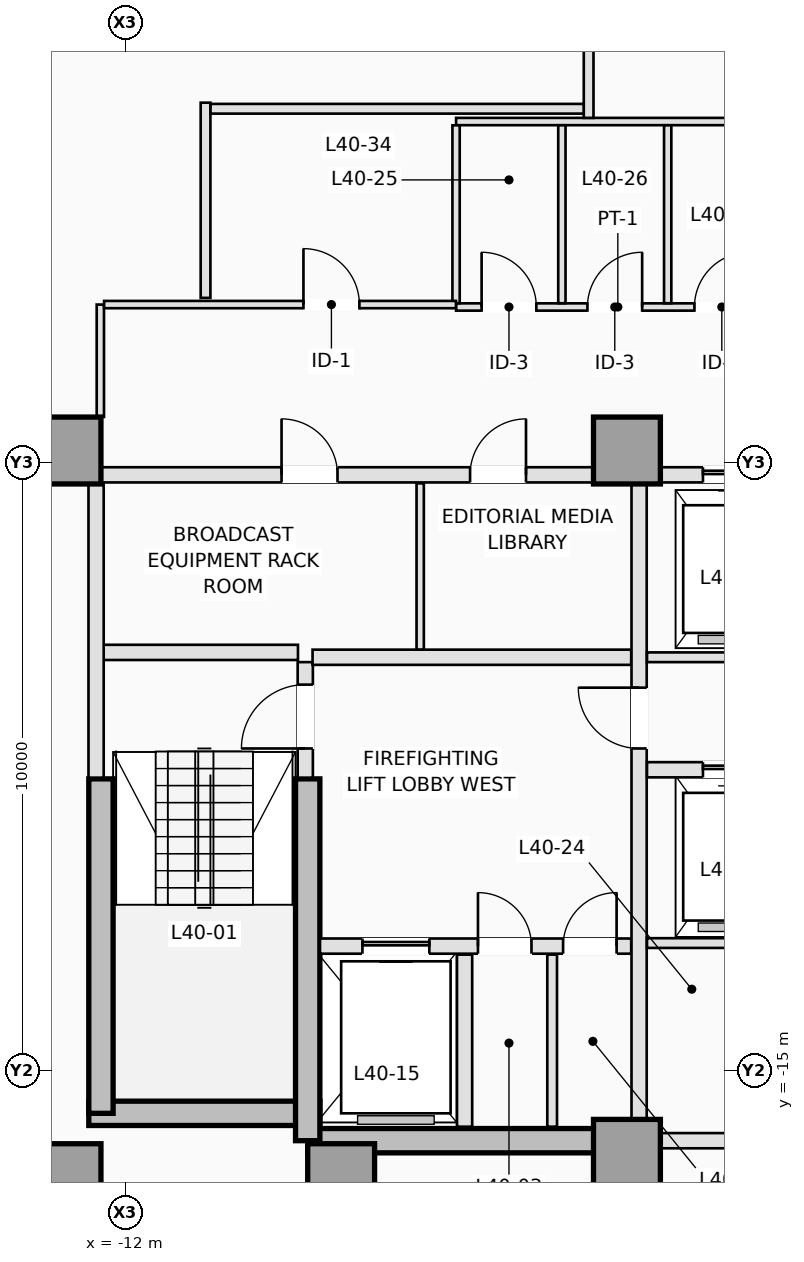
"""IFC4 building model, lengths in metres.
Left out: names, types, materials, properties, quantities, classifications, styles, units other than length and angle.
Written with IfcOpenShell. Run it as: python <this file> out.ifc"""

import sys

from ifc_helpers import new_model, si_unit, direction, frame, frame_2d, origin, origin_2d, place, context, subcontext, project, spatial, rectangle, extrude, element, fill, save


model = new_model("IFC4")
c1 = context("Model", 3, precision=1e-05, world=origin(), true_north=direction((0.0, 1.0)))
c2 = subcontext(c1, "Body", "Model", "MODEL_VIEW")
j1 = project(units=[si_unit("LENGTHUNIT", "METRE"), si_unit("PLANEANGLEUNIT", "RADIAN")], contexts=[c1])
p1 = place(None, origin())
s1 = spatial("IfcSite", under=j1, at=p1, CompositionType="ELEMENT")
p2 = place(p1, origin())
s2 = spatial("IfcBuilding", under=s1, at=p2, CompositionType="ELEMENT")
p3 = place(p2, frame((0.0, 0.0, 147.5)))
s3 = spatial("IfcBuildingStorey", under=s2, at=p3, CompositionType="ELEMENT", Elevation=147.5)
p4 = place(p3, frame((-12.6, -15.7, 0.0), z_axis=(0.0, 0.0, 1.0), x_axis=(1.0, 0.0, 0.0)))
e1 = element("IfcWall", 1, at=p4, inside=s3, PredefinedType="SHEAR", context=c2, shape_type="SweptSolid", body=[
    extrude(rectangle(XDim=3.8, YDim=0.4, at=frame_2d((1.9, 0.0))), origin(), (0.0, 0.0, 1.0), 3.5),
])
p5 = place(p3, frame((-9.0, -16.15, 0.0), z_axis=(0.0, 0.0, 1.0), x_axis=(1.0, 0.0, 0.0)))
e2 = element("IfcWall", 2, at=p5, inside=s3, PredefinedType="SHEAR", context=c2, shape_type="SweptSolid", body=[
    extrude(rectangle(XDim=5.25, YDim=0.4, at=frame_2d((2.625, 0.0))), origin(), (0.0, 0.0, 1.0), 3.5),
])
p6 = place(p3, frame((-12.4, -15.7, 0.0), z_axis=(0.0, 0.0, 1.0), x_axis=(0.0, 1.0, 0.0)))
e3 = element("IfcWall", 3, at=p6, inside=s3, PredefinedType="SHEAR", context=c2, shape_type="SweptSolid", body=[
    extrude(rectangle(XDim=5.5, YDim=0.4, at=frame_2d((2.75, 0.0))), origin(), (0.0, 0.0, 1.0), 3.5),
])
p7 = place(p3, frame((-9.0, -16.15, 0.0), z_axis=(0.0, 0.0, 1.0), x_axis=(0.0, 1.0, 0.0)))
e4 = element("IfcWall", 4, at=p7, inside=s3, PredefinedType="SHEAR", context=c2, shape_type="SweptSolid", body=[
    extrude(rectangle(XDim=5.95, YDim=0.4, at=frame_2d((2.975, 0.0))), origin(), (0.0, 0.0, 1.0), 3.5),
])
for number, where, z_axis, x_axis in (
    (5, (-12.95, -16.75, 0.0), (0.0, 0.0, 1.0), (1.0, 0.0, 0.0)),
    (6, (-8.45, -16.75, 0.0), (0.0, 0.0, 1.0), (1.0, 0.0, 0.0)),
    (7, (-3.75, -16.35, 0.0), (0.0, 0.0, 1.0), (1.0, 0.0, 0.0)),
    (8, (-12.95, -4.8, 0.0), (0.0, 0.0, 1.0), (1.0, 0.0, 0.0)),
    (9, (-3.75, -4.8, 0.0), (0.0, 0.0, 1.0), (1.0, 0.0, 0.0)),
):
    element("IfcColumn", number, at=place(p3, frame(where, z_axis=z_axis, x_axis=x_axis)), inside=s3, PredefinedType="COLUMN", context=c2, shape_type="SweptSolid", body=[
        extrude(rectangle(XDim=1.1, YDim=1.1, at=origin_2d()), origin(), (0.0, 0.0, 1.0), 3.5),
    ])
p8 = place(p3, frame((-15.383, -0.305, 0.0), z_axis=(0.0, 0.0, 1.0), x_axis=(0.490232095789, 0.871591929895, 0.0)))
e10 = element("IfcWall", 10, at=p8, inside=s3, PredefinedType="STANDARD", context=c2, shape_type="SweptSolid", body=[
    extrude(rectangle(XDim=4.375, YDim=0.28, at=frame_2d((2.188, 0.0))), origin(), (0.0, 0.0, 1.0), 3.25),
])
p9 = place(p3, frame((-9.04, -10.18, 0.0), z_axis=(0.0, 0.0, 1.0), x_axis=(0.0, 1.0, 0.0)))
e11 = element("IfcWall", 11, at=p9, inside=s3, PredefinedType="PARTITIONING", context=c2, shape_type="SweptSolid", body=[
    extrude(rectangle(XDim=1.9, YDim=0.25, at=frame_2d((0.95, 0.0))), origin(), (0.0, 0.0, 1.0), 3.25),
])
p10 = place(p9, frame((0.48, 0.0, 0.0)))
e12 = element("IfcOpeningElement", 12, at=p10, cuts=e11, PredefinedType="OPENING", context=c2, shape_type="SweptSolid", body=[
    extrude(rectangle(XDim=1.05, YDim=2.15, at=frame_2d((0.525, 1.075))), frame((0.0, 0.135, 0.0), z_axis=(0.0, -1.0, 0.0), x_axis=(1.0, 0.0, 0.0)), (0.0, 0.0, 1.0), 0.27),
])
p11 = place(p3, frame((-12.38, -8.12, 0.0), z_axis=(0.0, 0.0, 1.0), x_axis=(1.0, 0.0, 0.0)))
e13 = element("IfcWall", 13, at=p11, inside=s3, PredefinedType="PARTITIONING", context=c2, shape_type="SweptSolid", body=[
    extrude(rectangle(XDim=3.22, YDim=0.25, at=frame_2d((1.61, 0.0))), origin(), (0.0, 0.0, 1.0), 3.25),
])
p12 = place(p3, frame((-12.48, -10.18, 0.0), z_axis=(0.0, 0.0, 1.0), x_axis=(0.0, 1.0, 0.0)))
e14 = element("IfcWall", 14, at=p12, inside=s3, PredefinedType="PARTITIONING", context=c2, shape_type="SweptSolid", body=[
    extrude(rectangle(XDim=4.828, YDim=0.25, at=frame_2d((2.414, 0.0))), origin(), (0.0, 0.0, 1.0), 3.25),
])
p13 = place(p3, frame((-8.798, -12.95, 0.0), z_axis=(0.0, 0.0, 1.0), x_axis=(1.0, 0.0, 0.0)))
e15 = element("IfcWall", 15, at=p13, inside=s3, PredefinedType="PARTITIONING", context=c2, shape_type="SweptSolid", body=[
    extrude(rectangle(XDim=5.118, YDim=0.25, at=frame_2d((2.559, 0.0))), origin(), (0.0, 0.0, 1.0), 3.25),
])
p14 = place(p13, frame((0.698, 0.0, 0.0)))
e16 = element("IfcOpeningElement", 16, at=p14, cuts=e15, PredefinedType="OPENING", context=c2, shape_type="SweptSolid", body=[
    extrude(rectangle(XDim=1.1, YDim=2.15, at=frame_2d((0.55, 1.075))), frame((0.0, 0.135, 0.0), z_axis=(0.0, -1.0, 0.0), x_axis=(1.0, 0.0, 0.0)), (0.0, 0.0, 1.0), 0.27),
])
p15 = place(p13, frame((2.598, 0.0, 0.0)))
e17 = element("IfcOpeningElement", 17, at=p15, cuts=e15, PredefinedType="OPENING", context=c2, shape_type="SweptSolid", body=[
    extrude(rectangle(XDim=0.88, YDim=2.1, at=frame_2d((0.44, 1.05))), frame((0.0, 0.135, 0.0), z_axis=(0.0, -1.0, 0.0), x_axis=(1.0, 0.0, 0.0)), (0.0, 0.0, 1.0), 0.27),
])
p16 = place(p13, frame((3.998, 0.0, 0.0)))
e18 = element("IfcOpeningElement", 18, at=p16, cuts=e15, PredefinedType="OPENING", context=c2, shape_type="SweptSolid", body=[
    extrude(rectangle(XDim=0.88, YDim=2.1, at=frame_2d((0.44, 1.05))), frame((0.0, 0.135, 0.0), z_axis=(0.0, -1.0, 0.0), x_axis=(1.0, 0.0, 0.0)), (0.0, 0.0, 1.0), 0.27),
])
p17 = place(p3, frame((-6.42, -15.92, 0.0), z_axis=(0.0, 0.0, 1.0), x_axis=(0.0, 1.0, 0.0)))
e19 = element("IfcWall", 19, at=p17, inside=s3, PredefinedType="PARTITIONING", context=c2, shape_type="SweptSolid", body=[
    extrude(rectangle(XDim=2.83, YDim=0.25, at=frame_2d((1.415, 0.0))), origin(), (0.0, 0.0, 1.0), 3.25),
])
p18 = place(p3, frame((-4.98, -15.92, 0.0), z_axis=(0.0, 0.0, 1.0), x_axis=(0.0, 1.0, 0.0)))
e20 = element("IfcWall", 20, at=p18, inside=s3, PredefinedType="PARTITIONING", context=c2, shape_type="SweptSolid", body=[
    extrude(rectangle(XDim=2.83, YDim=0.16, at=frame_2d((1.415, 0.0))), origin(), (0.0, 0.0, 1.0), 3.25),
])
p19 = place(p3, frame((-8.92, -8.2, 0.0), z_axis=(0.0, 0.0, 1.0), x_axis=(1.0, 0.0, 0.0)))
e21 = element("IfcWall", 21, at=p19, inside=s3, PredefinedType="PARTITIONING", context=c2, shape_type="SweptSolid", body=[
    extrude(rectangle(XDim=5.24, YDim=0.25, at=frame_2d((2.62, 0.0))), origin(), (0.0, 0.0, 1.0), 3.25),
])
p20 = place(p3, frame((-3.55, -15.798, 0.0), z_axis=(0.0, 0.0, 1.0), x_axis=(0.0, 1.0, 0.0)))
e22 = element("IfcWall", 22, at=p20, inside=s3, PredefinedType="PARTITIONING", context=c2, shape_type="SweptSolid", body=[
    extrude(rectangle(XDim=10.446, YDim=0.25, at=frame_2d((5.223, 0.0))), origin(), (0.0, 0.0, 1.0), 3.25),
])
p21 = place(p20, frame((6.098, 0.0, 0.0)))
e23 = element("IfcOpeningElement", 23, at=p21, cuts=e22, PredefinedType="OPENING", context=c2, shape_type="SweptSolid", body=[
    extrude(rectangle(XDim=1.0, YDim=2.15, at=frame_2d((0.5, 1.075))), frame((0.0, 0.135, 0.0), z_axis=(0.0, -1.0, 0.0), x_axis=(1.0, 0.0, 0.0)), (0.0, 0.0, 1.0), 0.27),
])
p22 = place(p3, frame((-12.398, -5.2, 0.0), z_axis=(0.0, 0.0, 1.0), x_axis=(1.0, 0.0, 0.0)))
e24 = element("IfcWall", 24, at=p22, inside=s3, PredefinedType="PARTITIONING", context=c2, shape_type="SweptSolid", body=[
    extrude(rectangle(XDim=8.096, YDim=0.25, at=frame_2d((4.048, 0.0))), origin(), (0.0, 0.0, 1.0), 3.25),
])
p23 = place(p22, frame((2.968, 0.0, 0.0)))
e25 = element("IfcOpeningElement", 25, at=p23, cuts=e24, PredefinedType="OPENING", context=c2, shape_type="SweptSolid", body=[
    extrude(rectangle(XDim=0.92, YDim=2.12, at=frame_2d((0.46, 1.06))), frame((0.0, 0.135, 0.0), z_axis=(0.0, -1.0, 0.0), x_axis=(1.0, 0.0, 0.0)), (0.0, 0.0, 1.0), 0.27),
])
p24 = place(p22, frame((6.068, 0.0, 0.0)))
e26 = element("IfcOpeningElement", 26, at=p24, cuts=e24, PredefinedType="OPENING", context=c2, shape_type="SweptSolid", body=[
    extrude(rectangle(XDim=0.92, YDim=2.12, at=frame_2d((0.46, 1.06))), frame((0.0, 0.135, 0.0), z_axis=(0.0, -1.0, 0.0), x_axis=(1.0, 0.0, 0.0)), (0.0, 0.0, 1.0), 0.27),
])
p25 = place(p3, frame((-3.198, -5.2, 0.0), z_axis=(0.0, 0.0, 1.0), x_axis=(1.0, 0.0, 0.0)))
e27 = element("IfcWall", 27, at=p25, inside=s3, PredefinedType="PARTITIONING", context=c2, shape_type="SweptSolid", body=[
    extrude(rectangle(XDim=2.248, YDim=0.25, at=frame_2d((1.124, 0.0))), origin(), (0.0, 0.0, 1.0), 3.25),
])
p26 = place(p25, frame((0.698, 0.0, 0.0)))
e28 = element("IfcOpeningElement", 28, at=p26, cuts=e27, PredefinedType="OPENING", context=c2, shape_type="SweptSolid", body=[
    extrude(rectangle(XDim=1.0, YDim=2.15, at=frame_2d((0.5, 1.075))), frame((0.0, 0.135, 0.0), z_axis=(0.0, -1.0, 0.0), x_axis=(1.0, 0.0, 0.0)), (0.0, 0.0, 1.0), 0.27),
])
p27 = place(p3, frame((-7.15, -8.073, 0.0), z_axis=(0.0, 0.0, 1.0), x_axis=(0.0, 1.0, 0.0)))
e29 = element("IfcWall", 29, at=p27, inside=s3, PredefinedType="PARTITIONING", context=c2, shape_type="SweptSolid", body=[
    extrude(rectangle(XDim=2.733, YDim=0.12, at=frame_2d((1.366, 0.0))), origin(), (0.0, 0.0, 1.0), 3.25),
])
p28 = place(p3, frame((-3.198, -16.15, 0.0), z_axis=(0.0, 0.0, 1.0), x_axis=(1.0, 0.0, 0.0)))
e30 = element("IfcWall", 30, at=p28, inside=s3, PredefinedType="PARTITIONING", context=c2, shape_type="SweptSolid", body=[
    extrude(rectangle(XDim=6.396, YDim=0.25, at=frame_2d((3.198, 0.0))), origin(), (0.0, 0.0, 1.0), 2.45),
])
p29 = place(p3, frame((-3.42, -8.2, 0.0), z_axis=(0.0, 0.0, 1.0), x_axis=(1.0, 0.0, 0.0)))
e31 = element("IfcWall", 31, at=p29, inside=s3, PredefinedType="PARTITIONING", context=c2, shape_type="SweptSolid", body=[
    extrude(rectangle(XDim=2.47, YDim=0.16, at=frame_2d((1.235, 0.0))), origin(), (0.0, 0.0, 1.0), 3.25),
])
p30 = place(p3, frame((-3.42, -10.05, 0.0), z_axis=(0.0, 0.0, 1.0), x_axis=(1.0, 0.0, 0.0)))
e32 = element("IfcWall", 32, at=p30, inside=s3, PredefinedType="PARTITIONING", context=c2, shape_type="SweptSolid", body=[
    extrude(rectangle(XDim=2.47, YDim=0.25, at=frame_2d((1.235, 0.0))), origin(), (0.0, 0.0, 1.0), 3.25),
])
p31 = place(p30, frame((0.92, 0.0, 0.0)))
e33 = element("IfcOpeningElement", 33, at=p31, cuts=e32, PredefinedType="OPENING", context=c2, shape_type="SweptSolid", body=[
    extrude(rectangle(XDim=1.0, YDim=2.15, at=frame_2d((0.5, 1.075))), frame((0.0, 0.135, 0.0), z_axis=(0.0, -1.0, 0.0), x_axis=(1.0, 0.0, 0.0)), (0.0, 0.0, 1.0), 0.27),
])
p32 = place(p3, frame((-3.42, -12.9, 0.0), z_axis=(0.0, 0.0, 1.0), x_axis=(1.0, 0.0, 0.0)))
e34 = element("IfcWall", 34, at=p32, inside=s3, PredefinedType="PARTITIONING", context=c2, shape_type="SweptSolid", body=[
    extrude(rectangle(XDim=6.84, YDim=0.16, at=frame_2d((3.42, 0.0))), origin(), (0.0, 0.0, 1.0), 3.25),
])
p33 = place(p32, frame((2.98, 0.0, 0.0)))
e35 = element("IfcOpeningElement", 35, at=p33, cuts=e34, PredefinedType="OPENING", context=c2, shape_type="SweptSolid", body=[
    extrude(rectangle(XDim=0.88, YDim=2.12, at=frame_2d((0.44, 1.06))), frame((0.0, 0.09, 0.0), z_axis=(0.0, -1.0, 0.0), x_axis=(1.0, 0.0, 0.0)), (0.0, 0.0, 1.0), 0.18),
])
p34 = place(p3, frame((-6.56, -2.44, 0.0), z_axis=(0.0, 0.0, 1.0), x_axis=(1.0, 0.0, 0.0)))
e36 = element("IfcWall", 36, at=p34, inside=s3, PredefinedType="PARTITIONING", context=c2, shape_type="SweptSolid", body=[
    extrude(rectangle(XDim=5.32, YDim=0.12, at=frame_2d((2.66, 0.0))), origin(), (0.0, 0.0, 1.0), 2.891),
])
p35 = place(p34, frame((0.42, 0.0, 0.0)))
e37 = element("IfcOpeningElement", 37, at=p35, cuts=e36, PredefinedType="OPENING", context=c2, shape_type="SweptSolid", body=[
    extrude(rectangle(XDim=0.9, YDim=2.12, at=frame_2d((0.45, 1.06))), frame((0.0, 0.07, 0.0), z_axis=(0.0, -1.0, 0.0), x_axis=(1.0, 0.0, 0.0)), (0.0, 0.0, 1.0), 0.14),
])
p36 = place(p34, frame((2.16, 0.0, 0.0)))
e38 = element("IfcOpeningElement", 38, at=p36, cuts=e36, PredefinedType="OPENING", context=c2, shape_type="SweptSolid", body=[
    extrude(rectangle(XDim=0.9, YDim=2.12, at=frame_2d((0.45, 1.06))), frame((0.0, 0.07, 0.0), z_axis=(0.0, -1.0, 0.0), x_axis=(1.0, 0.0, 0.0)), (0.0, 0.0, 1.0), 0.14),
])
p37 = place(p34, frame((3.92, 0.0, 0.0)))
e39 = element("IfcOpeningElement", 39, at=p37, cuts=e36, PredefinedType="OPENING", context=c2, shape_type="SweptSolid", body=[
    extrude(rectangle(XDim=0.9, YDim=2.12, at=frame_2d((0.45, 1.06))), frame((0.0, 0.07, 0.0), z_axis=(0.0, -1.0, 0.0), x_axis=(1.0, 0.0, 0.0)), (0.0, 0.0, 1.0), 0.14),
])
p38 = place(p3, frame((-6.56, 0.61, 0.0), z_axis=(0.0, 0.0, 1.0), x_axis=(1.0, 0.0, 0.0)))
e40 = element("IfcWall", 40, at=p38, inside=s3, PredefinedType="PARTITIONING", context=c2, shape_type="SweptSolid", body=[
    extrude(rectangle(XDim=5.32, YDim=0.12, at=frame_2d((2.66, 0.0))), origin(), (0.0, 0.0, 1.0), 3.25),
])
for number, where, z_axis, x_axis in (
    (41, (-6.56, -2.378, 0.0), (0.0, 0.0, 1.0), (0.0, 1.0, 0.0)),
    (42, (-4.82, -2.378, 0.0), (0.0, 0.0, 1.0), (0.0, 1.0, 0.0)),
    (43, (-3.08, -2.378, 0.0), (0.0, 0.0, 1.0), (0.0, 1.0, 0.0)),
):
    element("IfcWall", number, at=place(p3, frame(where, z_axis=z_axis, x_axis=x_axis)), inside=s3, PredefinedType="PARTITIONING", context=c2, shape_type="SweptSolid", body=[
        extrude(rectangle(XDim=2.926, YDim=0.12, at=frame_2d((1.463, 0.0))), origin(), (0.0, 0.0, 1.0), 3.25),
    ])
p39 = place(p3, frame((-12.41, -4.248, 0.0), z_axis=(0.0, 0.0, 1.0), x_axis=(0.0, 1.0, 0.0)))
e44 = element("IfcWall", 44, at=p39, inside=s3, PredefinedType="PARTITIONING", context=c2, shape_type="SweptSolid", body=[
    extrude(rectangle(XDim=1.848, YDim=0.12, at=frame_2d((0.924, 0.0))), origin(), (0.0, 0.0, 1.0), 3.25),
])
p40 = place(p3, frame((-12.348, -2.4, 0.0), z_axis=(0.0, 0.0, 1.0), x_axis=(1.0, 0.0, 0.0)))
e45 = element("IfcWall", 45, at=p40, inside=s3, PredefinedType="PARTITIONING", context=c2, shape_type="SweptSolid", body=[
    extrude(rectangle(XDim=5.786, YDim=0.12, at=frame_2d((2.893, 0.0))), origin(), (0.0, 0.0, 1.0), 3.25),
])
p41 = place(p40, frame((3.278, 0.0, 0.0)))
e46 = element("IfcOpeningElement", 46, at=p41, cuts=e45, PredefinedType="OPENING", context=c2, shape_type="SweptSolid", body=[
    extrude(rectangle(XDim=0.92, YDim=2.12, at=frame_2d((0.46, 1.06))), frame((0.0, 0.07, 0.0), z_axis=(0.0, -1.0, 0.0), x_axis=(1.0, 0.0, 0.0)), (0.0, 0.0, 1.0), 0.14),
])
p42 = place(p3, frame((-4.38, 0.67, 0.0), z_axis=(0.0, 0.0, 1.0), x_axis=(0.0, 1.0, 0.0)))
e47 = element("IfcWall", 47, at=p42, inside=s3, PredefinedType="PARTITIONING", context=c2, shape_type="SweptSolid", body=[
    extrude(rectangle(XDim=2.978, YDim=0.16, at=frame_2d((1.489, 0.0))), origin(), (0.0, 0.0, 1.0), 3.25),
])
p43 = place(p3, frame((-10.68, -2.29, 0.0), z_axis=(0.0, 0.0, 1.0), x_axis=(0.0, 1.0, 0.0)))
e48 = element("IfcWall", 48, at=p43, inside=s3, PredefinedType="PARTITIONING", context=c2, shape_type="SweptSolid", body=[
    extrude(rectangle(XDim=3.21, YDim=0.16, at=frame_2d((1.605, 0.0))), origin(), (0.0, 0.0, 1.0), 3.25),
])
p44 = place(p3, frame((-10.598, 0.82, 0.0), z_axis=(0.0, 0.0, 1.0), x_axis=(1.0, 0.0, 0.0)))
e49 = element("IfcWall", 49, at=p44, inside=s3, PredefinedType="PARTITIONING", context=c2, shape_type="SweptSolid", body=[
    extrude(rectangle(XDim=6.136, YDim=0.16, at=frame_2d((3.068, 0.0))), origin(), (0.0, 0.0, 1.0), 3.25),
])
p45 = place(p26, origin())
e50 = element("IfcDoor", 50, at=p45, inside=s3, OperationType="SLIDING_TO_LEFT", PredefinedType="DOOR", context=c2, shape_type="SweptSolid", body=[
    extrude(rectangle(XDim=1.0, YDim=2.15, at=frame_2d((0.5, 1.075))), frame((0.0, 0.025, 0.0), z_axis=(0.0, -1.0, 0.0), x_axis=(1.0, 0.0, 0.0)), (0.0, 0.0, 1.0), 0.05),
])
fill(e28, e50)
p46 = place(p14, origin())
e51 = element("IfcDoor", 51, at=p46, inside=s3, OperationType="SLIDING_TO_LEFT", PredefinedType="DOOR", context=c2, shape_type="SweptSolid", body=[
    extrude(rectangle(XDim=1.1, YDim=2.15, at=frame_2d((0.55, 1.075))), frame((0.0, 0.025, 0.0), z_axis=(0.0, -1.0, 0.0), x_axis=(1.0, 0.0, 0.0)), (0.0, 0.0, 1.0), 0.05),
])
fill(e16, e51)
p47 = place(p31, origin())
e52 = element("IfcDoor", 52, at=p47, inside=s3, OperationType="SLIDING_TO_LEFT", PredefinedType="DOOR", context=c2, shape_type="SweptSolid", body=[
    extrude(rectangle(XDim=1.0, YDim=2.15, at=frame_2d((0.5, 1.075))), frame((0.0, 0.025, 0.0), z_axis=(0.0, -1.0, 0.0), x_axis=(1.0, 0.0, 0.0)), (0.0, 0.0, 1.0), 0.05),
])
fill(e33, e52)
p48 = place(p10, origin())
e53 = element("IfcDoor", 53, at=p48, inside=s3, OperationType="SINGLE_SWING_LEFT", PredefinedType="DOOR", context=c2, shape_type="SweptSolid", body=[
    extrude(rectangle(XDim=1.05, YDim=2.15, at=frame_2d((0.525, 1.075))), frame((0.0, 0.025, 0.0), z_axis=(0.0, -1.0, 0.0), x_axis=(1.0, 0.0, 0.0)), (0.0, 0.0, 1.0), 0.05),
])
fill(e12, e53)
p49 = place(p15, origin())
e54 = element("IfcDoor", 54, at=p49, inside=s3, OperationType="SINGLE_SWING_LEFT", PredefinedType="TRAPDOOR", context=c2, shape_type="SweptSolid", body=[
    extrude(rectangle(XDim=0.88, YDim=2.1, at=frame_2d((0.44, 1.05))), frame((0.0, 0.025, 0.0), z_axis=(0.0, -1.0, 0.0), x_axis=(1.0, 0.0, 0.0)), (0.0, 0.0, 1.0), 0.05),
])
fill(e17, e54)
p50 = place(p16, origin())
e55 = element("IfcDoor", 55, at=p50, inside=s3, OperationType="SINGLE_SWING_RIGHT", PredefinedType="TRAPDOOR", context=c2, shape_type="SweptSolid", body=[
    extrude(rectangle(XDim=0.88, YDim=2.1, at=frame_2d((0.44, 1.05))), frame((0.0, 0.025, 0.0), z_axis=(0.0, -1.0, 0.0), x_axis=(1.0, 0.0, 0.0)), (0.0, 0.0, 1.0), 0.05),
])
fill(e18, e55)
p51 = place(p21, origin())
e56 = element("IfcDoor", 56, at=p51, inside=s3, OperationType="SINGLE_SWING_RIGHT", PredefinedType="DOOR", context=c2, shape_type="SweptSolid", body=[
    extrude(rectangle(XDim=1.0, YDim=2.15, at=frame_2d((0.5, 1.075))), frame((0.0, 0.025, 0.0), z_axis=(0.0, -1.0, 0.0), x_axis=(1.0, 0.0, 0.0)), (0.0, 0.0, 1.0), 0.05),
])
fill(e23, e56)
p52 = place(p23, origin())
e57 = element("IfcDoor", 57, at=p52, inside=s3, OperationType="SINGLE_SWING_LEFT", PredefinedType="DOOR", context=c2, shape_type="SweptSolid", body=[
    extrude(rectangle(XDim=0.92, YDim=2.12, at=frame_2d((0.46, 1.06))), frame((0.0, 0.025, 0.0), z_axis=(0.0, -1.0, 0.0), x_axis=(1.0, 0.0, 0.0)), (0.0, 0.0, 1.0), 0.05),
])
fill(e25, e57)
p53 = place(p24, origin())
e58 = element("IfcDoor", 58, at=p53, inside=s3, OperationType="SINGLE_SWING_RIGHT", PredefinedType="DOOR", context=c2, shape_type="SweptSolid", body=[
    extrude(rectangle(XDim=0.92, YDim=2.12, at=frame_2d((0.46, 1.06))), frame((0.0, 0.025, 0.0), z_axis=(0.0, -1.0, 0.0), x_axis=(1.0, 0.0, 0.0)), (0.0, 0.0, 1.0), 0.05),
])
fill(e26, e58)
p54 = place(p35, origin())
e59 = element("IfcDoor", 59, at=p54, inside=s3, OperationType="SINGLE_SWING_LEFT", PredefinedType="DOOR", context=c2, shape_type="SweptSolid", body=[
    extrude(rectangle(XDim=0.9, YDim=2.12, at=frame_2d((0.45, 1.06))), frame((0.0, 0.025, 0.0), z_axis=(0.0, -1.0, 0.0), x_axis=(1.0, 0.0, 0.0)), (0.0, 0.0, 1.0), 0.05),
])
fill(e37, e59)
p55 = place(p36, origin())
e60 = element("IfcDoor", 60, at=p55, inside=s3, OperationType="SINGLE_SWING_RIGHT", PredefinedType="DOOR", context=c2, shape_type="SweptSolid", body=[
    extrude(rectangle(XDim=0.9, YDim=2.12, at=frame_2d((0.45, 1.06))), frame((0.0, 0.025, 0.0), z_axis=(0.0, -1.0, 0.0), x_axis=(1.0, 0.0, 0.0)), (0.0, 0.0, 1.0), 0.05),
])
fill(e38, e60)
p56 = place(p37, origin())
e61 = element("IfcDoor", 61, at=p56, inside=s3, OperationType="SINGLE_SWING_RIGHT", PredefinedType="DOOR", context=c2, shape_type="SweptSolid", body=[
    extrude(rectangle(XDim=0.9, YDim=2.12, at=frame_2d((0.45, 1.06))), frame((0.0, 0.025, 0.0), z_axis=(0.0, -1.0, 0.0), x_axis=(1.0, 0.0, 0.0)), (0.0, 0.0, 1.0), 0.05),
])
fill(e39, e61)
p57 = place(p41, origin())
e62 = element("IfcDoor", 62, at=p57, inside=s3, OperationType="SINGLE_SWING_LEFT", PredefinedType="DOOR", context=c2, shape_type="SweptSolid", body=[
    extrude(rectangle(XDim=0.92, YDim=2.12, at=frame_2d((0.46, 1.06))), frame((0.0, 0.025, 0.0), z_axis=(0.0, -1.0, 0.0), x_axis=(1.0, 0.0, 0.0)), (0.0, 0.0, 1.0), 0.05),
])
fill(e46, e62)
save(model, sys.argv[1])
